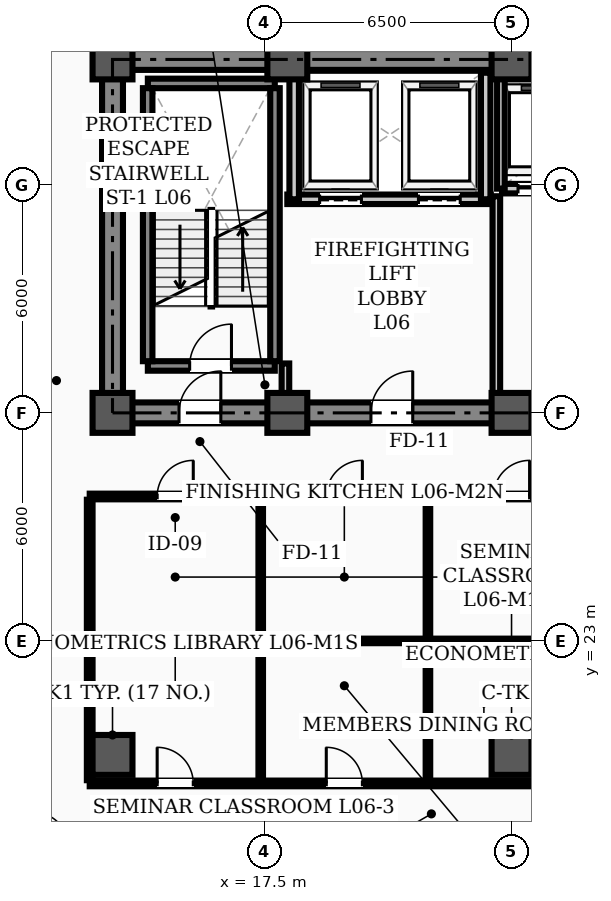
"""IFC4 building model, lengths in metres.
Left out: names, types, materials, properties, quantities, classifications, styles, units other than length and angle.
Written with IfcOpenShell. Run it as: python <this file> out.ifc"""

import sys

from ifc_helpers import new_model, si_unit, direction, frame, frame_2d, origin, origin_2d, place, context, subcontext, project, spatial, rectangle, hollow_rectangle, extrude, element, fill, save


model = new_model("IFC4")
c1 = context("Model", 3, precision=1e-05, world=origin(), true_north=direction((0.0, 1.0)))
c2 = subcontext(c1, "Body", "Model", "MODEL_VIEW")
j1 = project(units=[si_unit("LENGTHUNIT", "METRE"), si_unit("PLANEANGLEUNIT", "RADIAN")], contexts=[c1])
p1 = place(None, origin())
s1 = spatial("IfcSite", under=j1, at=p1, CompositionType="ELEMENT")
p2 = place(p1, origin())
s2 = spatial("IfcBuilding", under=s1, at=p2, CompositionType="ELEMENT")
p3 = place(p2, frame((0.0, 0.0, 26.5)))
s3 = spatial("IfcBuildingStorey", under=s2, at=p3, CompositionType="ELEMENT", Elevation=26.5)
for number, where, z_axis, x_axis in (
    (1, (13.5, 29.0, 0.0), (0.0, 0.0, 1.0), (1.0, 0.0, 0.0)),
    (2, (13.5, 38.3, 0.0), (0.0, 0.0, 1.0), (1.0, 0.0, 0.0)),
    (3, (18.1, 29.0, 0.0), (0.0, 0.0, 1.0), (1.0, 0.0, 0.0)),
    (4, (18.1, 38.3, 0.0), (0.0, 0.0, 1.0), (1.0, 0.0, 0.0)),
    (5, (24.0, 29.0, 0.0), (0.0, 0.0, 1.0), (1.0, 0.0, 0.0)),
    (6, (24.0, 38.3, 0.0), (0.0, 0.0, 1.0), (1.0, 0.0, 0.0)),
    (7, (13.5, 20.0, 0.0), (0.0, 0.0, 1.0), (1.0, 0.0, 0.0)),
    (8, (24.0, 20.0, 0.0), (0.0, 0.0, 1.0), (1.0, 0.0, 0.0)),
):
    element("IfcColumn", number, at=place(p3, frame(where, z_axis=z_axis, x_axis=x_axis)), inside=s3, PredefinedType="COLUMN", context=c2, shape_type="SweptSolid", body=[
        extrude(hollow_rectangle(XDim=1.05, YDim=1.05, WallThickness=0.038, InnerFilletRadius=0.019, OuterFilletRadius=0.057, at=origin_2d()), origin(), (0.0, 0.0, 1.0), 3.9),
    ])
p4 = place(p3, frame((13.5, 29.0, 0.0), z_axis=(0.0, 0.0, 1.0), x_axis=(1.0, 0.0, 0.0)))
e9 = element("IfcWall", 9, at=p4, inside=s3, PredefinedType="SHEAR", context=c2, shape_type="SweptSolid", body=[
    extrude(rectangle(XDim=30.5, YDim=0.55, at=frame_2d((15.25, 0.0))), origin(), (0.0, 0.0, 1.0), 3.72),
])
p5 = place(p4, frame((1.75, 0.0, 0.0)))
e10 = element("IfcOpeningElement", 10, at=p5, cuts=e9, PredefinedType="OPENING", context=c2, shape_type="SweptSolid", body=[
    extrude(rectangle(XDim=1.1, YDim=2.08, at=frame_2d((0.55, 1.04))), frame((0.0, 0.285, 0.0), z_axis=(0.0, -1.0, 0.0), x_axis=(1.0, 0.0, 0.0)), (0.0, 0.0, 1.0), 0.57),
])
p6 = place(p4, frame((26.7, 0.0, 0.0)))
e11 = element("IfcOpeningElement", 11, at=p6, cuts=e9, PredefinedType="OPENING", context=c2, shape_type="SweptSolid", body=[
    extrude(rectangle(XDim=1.1, YDim=2.08, at=frame_2d((0.55, 1.04))), frame((0.0, 0.285, 0.0), z_axis=(0.0, -1.0, 0.0), x_axis=(1.0, 0.0, 0.0)), (0.0, 0.0, 1.0), 0.57),
])
p7 = place(p4, frame((6.8, 0.0, 0.0)))
e12 = element("IfcOpeningElement", 12, at=p7, cuts=e9, PredefinedType="OPENING", context=c2, shape_type="SweptSolid", body=[
    extrude(rectangle(XDim=1.1, YDim=2.08, at=frame_2d((0.55, 1.04))), frame((0.0, 0.285, 0.0), z_axis=(0.0, -1.0, 0.0), x_axis=(1.0, 0.0, 0.0)), (0.0, 0.0, 1.0), 0.57),
])
p8 = place(p4, frame((13.2, 0.0, 0.0)))
e13 = element("IfcOpeningElement", 13, at=p8, cuts=e9, PredefinedType="OPENING", context=c2, shape_type="SweptSolid", body=[
    extrude(rectangle(XDim=1.6, YDim=2.08, at=frame_2d((0.8, 1.04))), frame((0.0, 0.285, 0.0), z_axis=(0.0, -1.0, 0.0), x_axis=(1.0, 0.0, 0.0)), (0.0, 0.0, 1.0), 0.57),
])
p9 = place(p4, frame((20.525, 0.0, 0.0)))
e14 = element("IfcOpeningElement", 14, at=p9, cuts=e9, PredefinedType="OPENING", context=c2, shape_type="SweptSolid", body=[
    extrude(rectangle(XDim=0.95, YDim=2.08, at=frame_2d((0.475, 1.04))), frame((0.0, 0.285, 0.0), z_axis=(0.0, -1.0, 0.0), x_axis=(1.0, 0.0, 0.0)), (0.0, 0.0, 1.0), 0.57),
])
p10 = place(p3, frame((13.5, 38.3, 0.0), z_axis=(0.0, 0.0, 1.0), x_axis=(1.0, 0.0, 0.0)))
e15 = element("IfcWall", 15, at=p10, inside=s3, PredefinedType="SHEAR", context=c2, shape_type="SweptSolid", body=[
    extrude(rectangle(XDim=30.5, YDim=0.55, at=frame_2d((15.25, 0.0))), origin(), (0.0, 0.0, 1.0), 3.72),
])
p11 = place(p3, frame((13.5, 29.35, 0.0), z_axis=(0.0, 0.0, 1.0), x_axis=(0.0, 1.0, 0.0)))
e16 = element("IfcWall", 16, at=p11, inside=s3, PredefinedType="SHEAR", context=c2, shape_type="SweptSolid", body=[
    extrude(rectangle(XDim=8.6, YDim=0.55, at=frame_2d((4.3, 0.0))), origin(), (0.0, 0.0, 1.0), 3.72),
])
p12 = place(p3, frame((14.43, 30.235, 0.0), z_axis=(0.0, 0.0, 1.0), x_axis=(1.0, 0.0, 0.0)))
e17 = element("IfcWall", 17, at=p12, inside=s3, PredefinedType="STANDARD", context=c2, shape_type="SweptSolid", body=[
    extrude(rectangle(XDim=3.34, YDim=0.25, at=frame_2d((1.67, 0.0))), origin(), (0.0, 0.0, 1.0), 3.72),
])
p13 = place(p12, frame((1.1, 0.0, 0.0)))
e18 = element("IfcOpeningElement", 18, at=p13, cuts=e17, PredefinedType="OPENING", context=c2, shape_type="SweptSolid", body=[
    extrude(rectangle(XDim=1.1, YDim=2.08, at=frame_2d((0.55, 1.04))), frame((0.0, 0.135, 0.0), z_axis=(0.0, -1.0, 0.0), x_axis=(1.0, 0.0, 0.0)), (0.0, 0.0, 1.0), 0.27),
])
p14 = place(p3, frame((14.43, 37.669, 0.0), z_axis=(0.0, 0.0, 1.0), x_axis=(1.0, 0.0, 0.0)))
e19 = element("IfcWall", 19, at=p14, inside=s3, PredefinedType="STANDARD", context=c2, shape_type="SweptSolid", body=[
    extrude(rectangle(XDim=3.34, YDim=0.25, at=frame_2d((1.67, 0.0))), origin(), (0.0, 0.0, 1.0), 3.72),
])
for number, where, z_axis, x_axis in (
    (20, (14.425, 30.36, 0.0), (0.0, 0.0, 1.0), (0.0, 1.0, 0.0)),
    (21, (17.775, 30.36, 0.0), (0.0, 0.0, 1.0), (0.0, 1.0, 0.0)),
):
    element("IfcWall", number, at=place(p3, frame(where, z_axis=z_axis, x_axis=x_axis)), inside=s3, PredefinedType="STANDARD", context=c2, shape_type="SweptSolid", body=[
        extrude(rectangle(XDim=7.184, YDim=0.25, at=frame_2d((3.592, 0.0))), origin(), (0.0, 0.0, 1.0), 3.72),
    ])
p15 = place(p3, frame((18.1, 34.62, 0.0), z_axis=(0.0, 0.0, 1.0), x_axis=(1.0, 0.0, 0.0)))
e22 = element("IfcWall", 22, at=p15, inside=s3, PredefinedType="STANDARD", context=c2, shape_type="SweptSolid", body=[
    extrude(rectangle(XDim=5.35, YDim=0.25, at=frame_2d((2.675, 0.0))), origin(), (0.0, 0.0, 1.0), 3.72),
])
p16 = place(p15, frame((0.85, 0.0, 0.0)))
e23 = element("IfcOpeningElement", 23, at=p16, cuts=e22, PredefinedType="OPENING", context=c2, shape_type="SweptSolid", body=[
    extrude(rectangle(XDim=1.1, YDim=2.08, at=frame_2d((0.55, 1.04))), frame((0.0, 0.135, 0.0), z_axis=(0.0, -1.0, 0.0), x_axis=(1.0, 0.0, 0.0)), (0.0, 0.0, 1.0), 0.27),
])
p17 = place(p15, frame((3.45, 0.0, 0.0)))
e24 = element("IfcOpeningElement", 24, at=p17, cuts=e22, PredefinedType="OPENING", context=c2, shape_type="SweptSolid", body=[
    extrude(rectangle(XDim=1.1, YDim=2.08, at=frame_2d((0.55, 1.04))), frame((0.0, 0.135, 0.0), z_axis=(0.0, -1.0, 0.0), x_axis=(1.0, 0.0, 0.0)), (0.0, 0.0, 1.0), 0.27),
])
for number, where, z_axis, x_axis in (
    (25, (18.28, 34.62, 0.0), (0.0, 0.0, 1.0), (0.0, 1.0, 0.0)),
    (26, (23.32, 34.62, 0.0), (0.0, 0.0, 1.0), (0.0, 1.0, 0.0)),
):
    element("IfcWall", number, at=place(p3, frame(where, z_axis=z_axis, x_axis=x_axis)), inside=s3, PredefinedType="STANDARD", context=c2, shape_type="SweptSolid", body=[
        extrude(rectangle(XDim=3.33, YDim=0.25, at=frame_2d((1.665, 0.0))), origin(), (0.0, 0.0, 1.0), 3.3),
    ])
p18 = place(p3, frame((23.75, 34.9, 0.0), z_axis=(0.0, 0.0, 1.0), x_axis=(1.0, 0.0, 0.0)))
e27 = element("IfcWall", 27, at=p18, inside=s3, PredefinedType="STANDARD", context=c2, shape_type="SweptSolid", body=[
    extrude(rectangle(XDim=4.4, YDim=0.25, at=frame_2d((2.2, 0.0))), origin(), (0.0, 0.0, 1.0), 3.72),
])
p19 = place(p18, frame((0.42, 0.0, 0.0)))
e28 = element("IfcOpeningElement", 28, at=p19, cuts=e27, PredefinedType="OPENING", context=c2, shape_type="SweptSolid", body=[
    extrude(rectangle(XDim=1.3, YDim=2.08, at=frame_2d((0.65, 1.04))), frame((0.0, 0.135, 0.0), z_axis=(0.0, -1.0, 0.0), x_axis=(1.0, 0.0, 0.0)), (0.0, 0.0, 1.0), 0.27),
])
p20 = place(p18, frame((2.68, 0.0, 0.0)))
e29 = element("IfcOpeningElement", 29, at=p20, cuts=e27, PredefinedType="OPENING", context=c2, shape_type="SweptSolid", body=[
    extrude(rectangle(XDim=1.3, YDim=2.08, at=frame_2d((0.65, 1.04))), frame((0.0, 0.135, 0.0), z_axis=(0.0, -1.0, 0.0), x_axis=(1.0, 0.0, 0.0)), (0.0, 0.0, 1.0), 0.27),
])
p21 = place(p3, frame((12.9, 26.8, 0.0), z_axis=(0.0, 0.0, 1.0), x_axis=(1.0, 0.0, 0.0)))
e30 = element("IfcWall", 30, at=p21, inside=s3, PredefinedType="PARTITIONING", context=c2, shape_type="SweptSolid", body=[
    extrude(rectangle(XDim=31.7, YDim=0.15, at=frame_2d((15.85, 0.0))), origin(), (0.0, 0.0, 1.0), 3.1),
])
p22 = place(p21, frame((13.6, 0.0, 0.0)))
e31 = element("IfcOpeningElement", 31, at=p22, cuts=e30, PredefinedType="OPENING", context=c2, shape_type="SweptSolid", body=[
    extrude(rectangle(XDim=1.6, YDim=2.08, at=frame_2d((0.8, 1.04))), frame((0.0, 0.085, 0.0), z_axis=(0.0, -1.0, 0.0), x_axis=(1.0, 0.0, 0.0)), (0.0, 0.0, 1.0), 0.17),
])
p23 = place(p21, frame((1.775, 0.0, 0.0)))
e32 = element("IfcOpeningElement", 32, at=p23, cuts=e30, PredefinedType="OPENING", context=c2, shape_type="SweptSolid", body=[
    extrude(rectangle(XDim=0.95, YDim=2.08, at=frame_2d((0.475, 1.04))), frame((0.0, 0.085, 0.0), z_axis=(0.0, -1.0, 0.0), x_axis=(1.0, 0.0, 0.0)), (0.0, 0.0, 1.0), 0.17),
])
p24 = place(p21, frame((6.225, 0.0, 0.0)))
e33 = element("IfcOpeningElement", 33, at=p24, cuts=e30, PredefinedType="OPENING", context=c2, shape_type="SweptSolid", body=[
    extrude(rectangle(XDim=0.95, YDim=2.08, at=frame_2d((0.475, 1.04))), frame((0.0, 0.085, 0.0), z_axis=(0.0, -1.0, 0.0), x_axis=(1.0, 0.0, 0.0)), (0.0, 0.0, 1.0), 0.17),
])
p25 = place(p21, frame((10.625, 0.0, 0.0)))
e34 = element("IfcOpeningElement", 34, at=p25, cuts=e30, PredefinedType="OPENING", context=c2, shape_type="SweptSolid", body=[
    extrude(rectangle(XDim=0.95, YDim=2.08, at=frame_2d((0.475, 1.04))), frame((0.0, 0.085, 0.0), z_axis=(0.0, -1.0, 0.0), x_axis=(1.0, 0.0, 0.0)), (0.0, 0.0, 1.0), 0.17),
])
p26 = place(p21, frame((16.075, 0.0, 0.0)))
e35 = element("IfcOpeningElement", 35, at=p26, cuts=e30, PredefinedType="OPENING", context=c2, shape_type="SweptSolid", body=[
    extrude(rectangle(XDim=0.95, YDim=2.08, at=frame_2d((0.475, 1.04))), frame((0.0, 0.085, 0.0), z_axis=(0.0, -1.0, 0.0), x_axis=(1.0, 0.0, 0.0)), (0.0, 0.0, 1.0), 0.17),
])
p27 = place(p21, frame((21.925, 0.0, 0.0)))
e36 = element("IfcOpeningElement", 36, at=p27, cuts=e30, PredefinedType="OPENING", context=c2, shape_type="SweptSolid", body=[
    extrude(rectangle(XDim=0.95, YDim=2.08, at=frame_2d((0.475, 1.04))), frame((0.0, 0.085, 0.0), z_axis=(0.0, -1.0, 0.0), x_axis=(1.0, 0.0, 0.0)), (0.0, 0.0, 1.0), 0.17),
])
p28 = place(p21, frame((28.625, 0.0, 0.0)))
e37 = element("IfcOpeningElement", 37, at=p28, cuts=e30, PredefinedType="OPENING", context=c2, shape_type="SweptSolid", body=[
    extrude(rectangle(XDim=0.95, YDim=2.08, at=frame_2d((0.475, 1.04))), frame((0.0, 0.085, 0.0), z_axis=(0.0, -1.0, 0.0), x_axis=(1.0, 0.0, 0.0)), (0.0, 0.0, 1.0), 0.17),
])
p29 = place(p3, frame((12.9, 19.25, 0.0), z_axis=(0.0, 0.0, 1.0), x_axis=(1.0, 0.0, 0.0)))
e38 = element("IfcWall", 38, at=p29, inside=s3, PredefinedType="PARTITIONING", context=c2, shape_type="SweptSolid", body=[
    extrude(rectangle(XDim=13.3, YDim=0.15, at=frame_2d((6.65, 0.0))), origin(), (0.0, 0.0, 1.0), 3.1),
])
p30 = place(p29, frame((1.775, 0.0, 0.0)))
e39 = element("IfcOpeningElement", 39, at=p30, cuts=e38, PredefinedType="OPENING", context=c2, shape_type="SweptSolid", body=[
    extrude(rectangle(XDim=0.95, YDim=2.08, at=frame_2d((0.475, 1.04))), frame((0.0, 0.085, 0.0), z_axis=(0.0, -1.0, 0.0), x_axis=(1.0, 0.0, 0.0)), (0.0, 0.0, 1.0), 0.17),
])
p31 = place(p29, frame((6.225, 0.0, 0.0)))
e40 = element("IfcOpeningElement", 40, at=p31, cuts=e38, PredefinedType="OPENING", context=c2, shape_type="SweptSolid", body=[
    extrude(rectangle(XDim=0.95, YDim=2.08, at=frame_2d((0.475, 1.04))), frame((0.0, 0.085, 0.0), z_axis=(0.0, -1.0, 0.0), x_axis=(1.0, 0.0, 0.0)), (0.0, 0.0, 1.0), 0.17),
])
p32 = place(p29, frame((12.175, 0.0, 0.0)))
e41 = element("IfcOpeningElement", 41, at=p32, cuts=e38, PredefinedType="OPENING", context=c2, shape_type="SweptSolid", body=[
    extrude(rectangle(XDim=0.95, YDim=2.08, at=frame_2d((0.475, 1.04))), frame((0.0, 0.085, 0.0), z_axis=(0.0, -1.0, 0.0), x_axis=(1.0, 0.0, 0.0)), (0.0, 0.0, 1.0), 0.17),
])
p33 = place(p3, frame((12.9, 23.0, 0.0), z_axis=(0.0, 0.0, 1.0), x_axis=(1.0, 0.0, 0.0)))
e42 = element("IfcWall", 42, at=p33, inside=s3, PredefinedType="PARTITIONING", context=c2, shape_type="SweptSolid", body=[
    extrude(rectangle(XDim=4.5, YDim=0.12, at=frame_2d((2.25, 0.0))), origin(), (0.0, 0.0, 1.0), 3.1),
])
p34 = place(p3, frame((17.4, 23.0, 0.0), z_axis=(0.0, 0.0, 1.0), x_axis=(1.0, 0.0, 0.0)))
e43 = element("IfcWall", 43, at=p34, inside=s3, PredefinedType="PARTITIONING", context=c2, shape_type="SweptSolid", body=[
    extrude(rectangle(XDim=4.4, YDim=0.12, at=frame_2d((2.2, 0.0))), origin(), (0.0, 0.0, 1.0), 3.3),
])
p35 = place(p3, frame((21.8, 23.0, 0.0), z_axis=(0.0, 0.0, 1.0), x_axis=(1.0, 0.0, 0.0)))
e44 = element("IfcWall", 44, at=p35, inside=s3, PredefinedType="PARTITIONING", context=c2, shape_type="SweptSolid", body=[
    extrude(rectangle(XDim=4.4, YDim=0.12, at=frame_2d((2.2, 0.0))), origin(), (0.0, 0.0, 1.0), 3.1),
])
p36 = place(p3, frame((18.05, 29.285, 0.0), z_axis=(0.0, 0.0, 1.0), x_axis=(0.0, 1.0, 0.0)))
e45 = element("IfcWall", 45, at=p36, inside=s3, PredefinedType="STANDARD", context=c2, shape_type="SweptSolid", body=[
    extrude(rectangle(XDim=1.015, YDim=0.2, at=frame_2d((0.508, 0.0))), origin(), (0.0, 0.0, 1.0), 3.3),
])
p37 = place(p3, frame((23.6, 29.285, 0.0), z_axis=(0.0, 0.0, 1.0), x_axis=(0.0, 1.0, 0.0)))
e46 = element("IfcWall", 46, at=p37, inside=s3, PredefinedType="STANDARD", context=c2, shape_type="SweptSolid", body=[
    extrude(rectangle(XDim=5.415, YDim=0.2, at=frame_2d((2.708, 0.0))), origin(), (0.0, 0.0, 1.0), 3.1),
])
p38 = place(p3, frame((12.9, 19.335, 0.0), z_axis=(0.0, 0.0, 1.0), x_axis=(0.0, 1.0, 0.0)))
e47 = element("IfcWall", 47, at=p38, inside=s3, PredefinedType="PARTITIONING", context=c2, shape_type="SweptSolid", body=[
    extrude(rectangle(XDim=7.38, YDim=0.15, at=frame_2d((3.69, 0.0))), origin(), (0.0, 0.0, 1.0), 3.0),
])
for number, where, z_axis, x_axis in (
    (48, (17.4, 19.335, 0.0), (0.0, 0.0, 1.0), (0.0, 1.0, 0.0)),
    (49, (21.8, 19.335, 0.0), (0.0, 0.0, 1.0), (0.0, 1.0, 0.0)),
):
    element("IfcWall", number, at=place(p3, frame(where, z_axis=z_axis, x_axis=x_axis)), inside=s3, PredefinedType="PARTITIONING", context=c2, shape_type="SweptSolid", body=[
        extrude(rectangle(XDim=7.38, YDim=0.12, at=frame_2d((3.69, 0.0))), origin(), (0.0, 0.0, 1.0), 3.0),
    ])
p39 = place(p3, frame((23.72, 34.9, 0.0), z_axis=(0.0, 0.0, 1.0), x_axis=(0.0, 1.0, 0.0)))
e50 = element("IfcWall", 50, at=p39, inside=s3, PredefinedType="STANDARD", context=c2, shape_type="SweptSolid", body=[
    extrude(rectangle(XDim=3.12, YDim=0.2, at=frame_2d((1.56, 0.0))), origin(), (0.0, 0.0, 1.0), 3.1),
])
p40 = place(p13, origin())
e51 = element("IfcDoor", 51, at=p40, inside=s3, OperationType="SINGLE_SWING_RIGHT", PredefinedType="DOOR", context=c2, shape_type="SweptSolid", body=[
    extrude(rectangle(XDim=1.1, YDim=2.08, at=frame_2d((0.55, 1.04))), frame((0.0, 0.025, 0.0), z_axis=(0.0, -1.0, 0.0), x_axis=(1.0, 0.0, 0.0)), (0.0, 0.0, 1.0), 0.05),
])
fill(e18, e51)
p41 = place(p5, origin())
e52 = element("IfcDoor", 52, at=p41, inside=s3, OperationType="SINGLE_SWING_RIGHT", PredefinedType="DOOR", context=c2, shape_type="SweptSolid", body=[
    extrude(rectangle(XDim=1.1, YDim=2.08, at=frame_2d((0.55, 1.04))), frame((0.0, 0.025, 0.0), z_axis=(0.0, -1.0, 0.0), x_axis=(1.0, 0.0, 0.0)), (0.0, 0.0, 1.0), 0.05),
])
fill(e10, e52)
p42 = place(p7, origin())
e53 = element("IfcDoor", 53, at=p42, inside=s3, OperationType="SINGLE_SWING_RIGHT", PredefinedType="DOOR", context=c2, shape_type="SweptSolid", body=[
    extrude(rectangle(XDim=1.1, YDim=2.08, at=frame_2d((0.55, 1.04))), frame((0.0, 0.025, 0.0), z_axis=(0.0, -1.0, 0.0), x_axis=(1.0, 0.0, 0.0)), (0.0, 0.0, 1.0), 0.05),
])
fill(e12, e53)
p43 = place(p23, origin())
e54 = element("IfcDoor", 54, at=p43, inside=s3, OperationType="SINGLE_SWING_RIGHT", PredefinedType="DOOR", context=c2, shape_type="SweptSolid", body=[
    extrude(rectangle(XDim=0.95, YDim=2.08, at=frame_2d((0.475, 1.04))), frame((0.0, 0.025, 0.0), z_axis=(0.0, -1.0, 0.0), x_axis=(1.0, 0.0, 0.0)), (0.0, 0.0, 1.0), 0.05),
])
fill(e32, e54)
p44 = place(p30, origin())
e55 = element("IfcDoor", 55, at=p44, inside=s3, OperationType="SINGLE_SWING_LEFT", PredefinedType="DOOR", context=c2, shape_type="SweptSolid", body=[
    extrude(rectangle(XDim=0.95, YDim=2.08, at=frame_2d((0.475, 1.04))), frame((0.0, 0.025, 0.0), z_axis=(0.0, -1.0, 0.0), x_axis=(1.0, 0.0, 0.0)), (0.0, 0.0, 1.0), 0.05),
])
fill(e39, e55)
p45 = place(p24, origin())
e56 = element("IfcDoor", 56, at=p45, inside=s3, OperationType="SINGLE_SWING_RIGHT", PredefinedType="DOOR", context=c2, shape_type="SweptSolid", body=[
    extrude(rectangle(XDim=0.95, YDim=2.08, at=frame_2d((0.475, 1.04))), frame((0.0, 0.025, 0.0), z_axis=(0.0, -1.0, 0.0), x_axis=(1.0, 0.0, 0.0)), (0.0, 0.0, 1.0), 0.05),
])
fill(e33, e56)
p46 = place(p31, origin())
e57 = element("IfcDoor", 57, at=p46, inside=s3, OperationType="SINGLE_SWING_LEFT", PredefinedType="DOOR", context=c2, shape_type="SweptSolid", body=[
    extrude(rectangle(XDim=0.95, YDim=2.08, at=frame_2d((0.475, 1.04))), frame((0.0, 0.025, 0.0), z_axis=(0.0, -1.0, 0.0), x_axis=(1.0, 0.0, 0.0)), (0.0, 0.0, 1.0), 0.05),
])
fill(e40, e57)
p47 = place(p25, origin())
e58 = element("IfcDoor", 58, at=p47, inside=s3, OperationType="SINGLE_SWING_RIGHT", PredefinedType="DOOR", context=c2, shape_type="SweptSolid", body=[
    extrude(rectangle(XDim=0.95, YDim=2.08, at=frame_2d((0.475, 1.04))), frame((0.0, 0.025, 0.0), z_axis=(0.0, -1.0, 0.0), x_axis=(1.0, 0.0, 0.0)), (0.0, 0.0, 1.0), 0.05),
])
fill(e34, e58)
p48 = place(p16, origin())
e59 = element("IfcDoor", 59, at=p48, inside=s3, OperationType="SLIDING_TO_LEFT", PredefinedType="DOOR", context=c2, shape_type="SweptSolid", body=[
    extrude(rectangle(XDim=1.1, YDim=2.08, at=frame_2d((0.55, 1.04))), frame((0.0, 0.025, 0.0), z_axis=(0.0, -1.0, 0.0), x_axis=(1.0, 0.0, 0.0)), (0.0, 0.0, 1.0), 0.05),
])
fill(e23, e59)
p49 = place(p17, origin())
e60 = element("IfcDoor", 60, at=p49, inside=s3, OperationType="SLIDING_TO_LEFT", PredefinedType="DOOR", context=c2, shape_type="SweptSolid", body=[
    extrude(rectangle(XDim=1.1, YDim=2.08, at=frame_2d((0.55, 1.04))), frame((0.0, 0.025, 0.0), z_axis=(0.0, -1.0, 0.0), x_axis=(1.0, 0.0, 0.0)), (0.0, 0.0, 1.0), 0.05),
])
fill(e24, e60)
p50 = place(p19, origin())
e61 = element("IfcDoor", 61, at=p50, inside=s3, OperationType="DOUBLE_DOOR_SLIDING", PredefinedType="DOOR", context=c2, shape_type="SweptSolid", body=[
    extrude(rectangle(XDim=1.3, YDim=2.08, at=frame_2d((0.65, 1.04))), frame((0.0, 0.025, 0.0), z_axis=(0.0, -1.0, 0.0), x_axis=(1.0, 0.0, 0.0)), (0.0, 0.0, 1.0), 0.05),
])
fill(e28, e61)
save(model, sys.argv[1])
